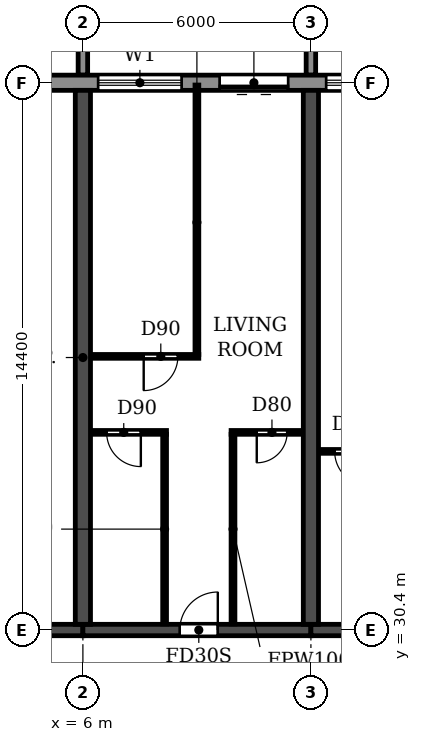
"""IFC4 building model, lengths in metres.
Left out: names, types, materials, properties, quantities, classifications, styles, units other than length and angle.
Written with IfcOpenShell. Run it as: python <this file> out.ifc"""

import sys

from ifc_helpers import new_model, si_unit, direction, frame, frame_2d, origin, place, context, subcontext, project, spatial, polyline, rectangle, outline, extrude, source, transform, mapped, element, fill, save


model = new_model("IFC4")
c1 = context("Model", 3, precision=1e-05, world=origin(), true_north=direction((0.0, 1.0)))
c2 = subcontext(c1, "Body", "Model", "MODEL_VIEW")
j1 = project(units=[si_unit("LENGTHUNIT", "METRE"), si_unit("PLANEANGLEUNIT", "RADIAN")], contexts=[c1])
p1 = place(None, origin())
s1 = spatial("IfcSite", under=j1, at=p1, CompositionType="ELEMENT")
p2 = place(p1, origin())
s2 = spatial("IfcBuilding", under=s1, at=p2, CompositionType="ELEMENT")
p3 = place(p2, frame((0.0, 0.0, 33.3)))
s3 = spatial("IfcBuildingStorey", under=s2, at=p3, CompositionType="ELEMENT", Elevation=33.3)
for number, where, z_axis, x_axis in (
    (1, (6.0, 30.55, 0.0), (0.0, 0.0, 1.0), (0.0, 1.0, 0.0)),
    (2, (12.0, 30.55, 0.0), (0.0, 0.0, 1.0), (0.0, 1.0, 0.0)),
):
    element("IfcWall", number, at=place(p3, frame(where, z_axis=z_axis, x_axis=x_axis)), inside=s3, PredefinedType="SHEAR", context=c2, shape_type="SweptSolid", body=[
        extrude(rectangle(XDim=14.05, YDim=0.4, at=frame_2d((7.025, 0.0))), origin(), (0.0, 0.0, 1.0), 3.05),
    ])
p4 = place(p3, frame((0.2, 30.4, 0.0), z_axis=(0.0, 0.0, 1.0), x_axis=(1.0, 0.0, 0.0)))
e3 = element("IfcWall", 3, at=p4, inside=s3, PredefinedType="SHEAR", context=c2, shape_type="SweptSolid", body=[
    extrude(rectangle(XDim=5.8, YDim=0.3, at=frame_2d((2.9, 0.0))), origin(), (0.0, 0.0, 1.0), 2.45),
])
p5 = place(p4, frame((2.3, 0.0, 0.0)))
e4 = element("IfcOpeningElement", 4, at=p5, cuts=e3, PredefinedType="OPENING", context=c2, shape_type="SweptSolid", body=[
    extrude(rectangle(XDim=1.0, YDim=2.1, at=frame_2d((0.5, 1.05))), frame((0.0, 0.16, 0.0), z_axis=(0.0, -1.0, 0.0), x_axis=(1.0, 0.0, 0.0)), (0.0, 0.0, 1.0), 0.32),
])
p6 = place(p3, frame((6.0, 30.4, 0.0), z_axis=(0.0, 0.0, 1.0), x_axis=(1.0, 0.0, 0.0)))
e5 = element("IfcWall", 5, at=p6, inside=s3, PredefinedType="SHEAR", context=c2, shape_type="SweptSolid", body=[
    extrude(rectangle(XDim=6.0, YDim=0.3, at=frame_2d((3.0, 0.0))), origin(), (0.0, 0.0, 1.0), 2.45),
])
p7 = place(p6, frame((2.55, 0.0, 0.0)))
e6 = element("IfcOpeningElement", 6, at=p7, cuts=e5, PredefinedType="OPENING", context=c2, shape_type="SweptSolid", body=[
    extrude(rectangle(XDim=1.0, YDim=2.1, at=frame_2d((0.5, 1.05))), frame((0.0, 0.16, 0.0), z_axis=(0.0, -1.0, 0.0), x_axis=(1.0, 0.0, 0.0)), (0.0, 0.0, 1.0), 0.32),
])
p8 = place(p3, frame((12.0, 30.4, 0.0), z_axis=(0.0, 0.0, 1.0), x_axis=(1.0, 0.0, 0.0)))
e7 = element("IfcWall", 7, at=p8, inside=s3, PredefinedType="SHEAR", context=c2, shape_type="SweptSolid", body=[
    extrude(rectangle(XDim=6.0, YDim=0.3, at=frame_2d((3.0, 0.0))), origin(), (0.0, 0.0, 1.0), 2.45),
])
p9 = place(p8, frame((2.55, 0.0, 0.0)))
e8 = element("IfcOpeningElement", 8, at=p9, cuts=e7, PredefinedType="OPENING", context=c2, shape_type="SweptSolid", body=[
    extrude(rectangle(XDim=1.0, YDim=2.1, at=frame_2d((0.5, 1.05))), frame((0.0, 0.16, 0.0), z_axis=(0.0, -1.0, 0.0), x_axis=(1.0, 0.0, 0.0)), (0.0, 0.0, 1.0), 0.32),
])
p10 = place(p3, frame((97.317, 44.8, 0.0), z_axis=(0.0, 0.0, 1.0), x_axis=(-1.0, 0.0, 0.0)))
e9 = element("IfcWall", 9, at=p10, inside=s3, PredefinedType="STANDARD", context=c2, shape_type="SweptSolid", body=[
    extrude(rectangle(XDim=92.634, YDim=0.4, at=frame_2d((46.317, 0.0))), origin(), (0.0, 0.0, 1.0), 3.05),
])
p11 = place(p10, frame((88.717, 0.0, 0.9)))
e10 = element("IfcOpeningElement", 10, at=p11, cuts=e9, PredefinedType="OPENING", context=c2, shape_type="SweptSolid", body=[
    extrude(rectangle(XDim=2.2, YDim=1.5, at=frame_2d((1.1, 0.75))), frame((0.0, 0.21, 0.0), z_axis=(0.0, -1.0, 0.0), x_axis=(1.0, 0.0, 0.0)), (0.0, 0.0, 1.0), 0.42),
])
p12 = place(p10, frame((85.917, 0.0, 0.0)))
e11 = element("IfcOpeningElement", 11, at=p12, cuts=e9, PredefinedType="OPENING", context=c2, shape_type="SweptSolid", body=[
    extrude(rectangle(XDim=1.8, YDim=2.4, at=frame_2d((0.9, 1.2))), frame((0.0, 0.21, 0.0), z_axis=(0.0, -1.0, 0.0), x_axis=(1.0, 0.0, 0.0)), (0.0, 0.0, 1.0), 0.42),
])
p13 = place(p10, frame((82.717, 0.0, 0.9)))
e12 = element("IfcOpeningElement", 12, at=p13, cuts=e9, PredefinedType="OPENING", context=c2, shape_type="SweptSolid", body=[
    extrude(rectangle(XDim=2.2, YDim=1.5, at=frame_2d((1.1, 0.75))), frame((0.0, 0.21, 0.0), z_axis=(0.0, -1.0, 0.0), x_axis=(1.0, 0.0, 0.0)), (0.0, 0.0, 1.0), 0.42),
])
p14 = place(p10, frame((79.917, 0.0, 0.0)))
e13 = element("IfcOpeningElement", 13, at=p14, cuts=e9, PredefinedType="OPENING", context=c2, shape_type="SweptSolid", body=[
    extrude(rectangle(XDim=1.8, YDim=2.4, at=frame_2d((0.9, 1.2))), frame((0.0, 0.21, 0.0), z_axis=(0.0, -1.0, 0.0), x_axis=(1.0, 0.0, 0.0)), (0.0, 0.0, 1.0), 0.42),
])
p15 = place(p10, frame((76.717, 0.0, 0.9)))
e14 = element("IfcOpeningElement", 14, at=p15, cuts=e9, PredefinedType="OPENING", context=c2, shape_type="SweptSolid", body=[
    extrude(rectangle(XDim=2.2, YDim=1.5, at=frame_2d((1.1, 0.75))), frame((0.0, 0.21, 0.0), z_axis=(0.0, -1.0, 0.0), x_axis=(1.0, 0.0, 0.0)), (0.0, 0.0, 1.0), 0.42),
])
p16 = place(p10, frame((73.717, 0.0, 0.9)))
e15 = element("IfcOpeningElement", 15, at=p16, cuts=e9, PredefinedType="OPENING", context=c2, shape_type="SweptSolid", body=[
    extrude(rectangle(XDim=2.2, YDim=1.5, at=frame_2d((1.1, 0.75))), frame((0.0, 0.21, 0.0), z_axis=(0.0, -1.0, 0.0), x_axis=(1.0, 0.0, 0.0)), (0.0, 0.0, 1.0), 0.42),
])
p17 = place(p10, frame((70.717, 0.0, 0.9)))
e16 = element("IfcOpeningElement", 16, at=p17, cuts=e9, PredefinedType="OPENING", context=c2, shape_type="SweptSolid", body=[
    extrude(rectangle(XDim=2.2, YDim=1.5, at=frame_2d((1.1, 0.75))), frame((0.0, 0.21, 0.0), z_axis=(0.0, -1.0, 0.0), x_axis=(1.0, 0.0, 0.0)), (0.0, 0.0, 1.0), 0.42),
])
p18 = place(p10, frame((67.917, 0.0, 0.0)))
e17 = element("IfcOpeningElement", 17, at=p18, cuts=e9, PredefinedType="OPENING", context=c2, shape_type="SweptSolid", body=[
    extrude(rectangle(XDim=1.8, YDim=2.4, at=frame_2d((0.9, 1.2))), frame((0.0, 0.21, 0.0), z_axis=(0.0, -1.0, 0.0), x_axis=(1.0, 0.0, 0.0)), (0.0, 0.0, 1.0), 0.42),
])
p19 = place(p10, frame((64.717, 0.0, 0.9)))
e18 = element("IfcOpeningElement", 18, at=p19, cuts=e9, PredefinedType="OPENING", context=c2, shape_type="SweptSolid", body=[
    extrude(rectangle(XDim=2.2, YDim=1.5, at=frame_2d((1.1, 0.75))), frame((0.0, 0.21, 0.0), z_axis=(0.0, -1.0, 0.0), x_axis=(1.0, 0.0, 0.0)), (0.0, 0.0, 1.0), 0.42),
])
p20 = place(p10, frame((61.717, 0.0, 0.9)))
e19 = element("IfcOpeningElement", 19, at=p20, cuts=e9, PredefinedType="OPENING", context=c2, shape_type="SweptSolid", body=[
    extrude(rectangle(XDim=2.2, YDim=1.5, at=frame_2d((1.1, 0.75))), frame((0.0, 0.21, 0.0), z_axis=(0.0, -1.0, 0.0), x_axis=(1.0, 0.0, 0.0)), (0.0, 0.0, 1.0), 0.42),
])
p21 = place(p10, frame((58.717, 0.0, 0.9)))
e20 = element("IfcOpeningElement", 20, at=p21, cuts=e9, PredefinedType="OPENING", context=c2, shape_type="SweptSolid", body=[
    extrude(rectangle(XDim=2.2, YDim=1.5, at=frame_2d((1.1, 0.75))), frame((0.0, 0.21, 0.0), z_axis=(0.0, -1.0, 0.0), x_axis=(1.0, 0.0, 0.0)), (0.0, 0.0, 1.0), 0.42),
])
p22 = place(p10, frame((55.917, 0.0, 0.0)))
e21 = element("IfcOpeningElement", 21, at=p22, cuts=e9, PredefinedType="OPENING", context=c2, shape_type="SweptSolid", body=[
    extrude(rectangle(XDim=1.8, YDim=2.4, at=frame_2d((0.9, 1.2))), frame((0.0, 0.21, 0.0), z_axis=(0.0, -1.0, 0.0), x_axis=(1.0, 0.0, 0.0)), (0.0, 0.0, 1.0), 0.42),
])
p23 = place(p10, frame((52.717, 0.0, 0.9)))
e22 = element("IfcOpeningElement", 22, at=p23, cuts=e9, PredefinedType="OPENING", context=c2, shape_type="SweptSolid", body=[
    extrude(rectangle(XDim=2.2, YDim=1.5, at=frame_2d((1.1, 0.75))), frame((0.0, 0.21, 0.0), z_axis=(0.0, -1.0, 0.0), x_axis=(1.0, 0.0, 0.0)), (0.0, 0.0, 1.0), 0.42),
])
p24 = place(p10, frame((49.717, 0.0, 0.9)))
e23 = element("IfcOpeningElement", 23, at=p24, cuts=e9, PredefinedType="OPENING", context=c2, shape_type="SweptSolid", body=[
    extrude(rectangle(XDim=2.2, YDim=1.5, at=frame_2d((1.1, 0.75))), frame((0.0, 0.21, 0.0), z_axis=(0.0, -1.0, 0.0), x_axis=(1.0, 0.0, 0.0)), (0.0, 0.0, 1.0), 0.42),
])
p25 = place(p10, frame((46.717, 0.0, 0.9)))
e24 = element("IfcOpeningElement", 24, at=p25, cuts=e9, PredefinedType="OPENING", context=c2, shape_type="SweptSolid", body=[
    extrude(rectangle(XDim=2.2, YDim=1.5, at=frame_2d((1.1, 0.75))), frame((0.0, 0.21, 0.0), z_axis=(0.0, -1.0, 0.0), x_axis=(1.0, 0.0, 0.0)), (0.0, 0.0, 1.0), 0.42),
])
p26 = place(p10, frame((43.917, 0.0, 0.0)))
e25 = element("IfcOpeningElement", 25, at=p26, cuts=e9, PredefinedType="OPENING", context=c2, shape_type="SweptSolid", body=[
    extrude(rectangle(XDim=1.8, YDim=2.4, at=frame_2d((0.9, 1.2))), frame((0.0, 0.21, 0.0), z_axis=(0.0, -1.0, 0.0), x_axis=(1.0, 0.0, 0.0)), (0.0, 0.0, 1.0), 0.42),
])
p27 = place(p10, frame((40.717, 0.0, 0.9)))
e26 = element("IfcOpeningElement", 26, at=p27, cuts=e9, PredefinedType="OPENING", context=c2, shape_type="SweptSolid", body=[
    extrude(rectangle(XDim=2.2, YDim=1.5, at=frame_2d((1.1, 0.75))), frame((0.0, 0.21, 0.0), z_axis=(0.0, -1.0, 0.0), x_axis=(1.0, 0.0, 0.0)), (0.0, 0.0, 1.0), 0.42),
])
p28 = place(p10, frame((37.717, 0.0, 0.9)))
e27 = element("IfcOpeningElement", 27, at=p28, cuts=e9, PredefinedType="OPENING", context=c2, shape_type="SweptSolid", body=[
    extrude(rectangle(XDim=2.2, YDim=1.5, at=frame_2d((1.1, 0.75))), frame((0.0, 0.21, 0.0), z_axis=(0.0, -1.0, 0.0), x_axis=(1.0, 0.0, 0.0)), (0.0, 0.0, 1.0), 0.42),
])
p29 = place(p10, frame((34.717, 0.0, 0.9)))
e28 = element("IfcOpeningElement", 28, at=p29, cuts=e9, PredefinedType="OPENING", context=c2, shape_type="SweptSolid", body=[
    extrude(rectangle(XDim=2.2, YDim=1.5, at=frame_2d((1.1, 0.75))), frame((0.0, 0.21, 0.0), z_axis=(0.0, -1.0, 0.0), x_axis=(1.0, 0.0, 0.0)), (0.0, 0.0, 1.0), 0.42),
])
p30 = place(p10, frame((31.917, 0.0, 0.0)))
e29 = element("IfcOpeningElement", 29, at=p30, cuts=e9, PredefinedType="OPENING", context=c2, shape_type="SweptSolid", body=[
    extrude(rectangle(XDim=1.8, YDim=2.4, at=frame_2d((0.9, 1.2))), frame((0.0, 0.21, 0.0), z_axis=(0.0, -1.0, 0.0), x_axis=(1.0, 0.0, 0.0)), (0.0, 0.0, 1.0), 0.42),
])
p31 = place(p10, frame((28.717, 0.0, 0.9)))
e30 = element("IfcOpeningElement", 30, at=p31, cuts=e9, PredefinedType="OPENING", context=c2, shape_type="SweptSolid", body=[
    extrude(rectangle(XDim=2.2, YDim=1.5, at=frame_2d((1.1, 0.75))), frame((0.0, 0.21, 0.0), z_axis=(0.0, -1.0, 0.0), x_axis=(1.0, 0.0, 0.0)), (0.0, 0.0, 1.0), 0.42),
])
p32 = place(p10, frame((25.717, 0.0, 0.9)))
e31 = element("IfcOpeningElement", 31, at=p32, cuts=e9, PredefinedType="OPENING", context=c2, shape_type="SweptSolid", body=[
    extrude(rectangle(XDim=2.2, YDim=1.5, at=frame_2d((1.1, 0.75))), frame((0.0, 0.21, 0.0), z_axis=(0.0, -1.0, 0.0), x_axis=(1.0, 0.0, 0.0)), (0.0, 0.0, 1.0), 0.42),
])
p33 = place(p10, frame((22.917, 0.0, 0.0)))
e32 = element("IfcOpeningElement", 32, at=p33, cuts=e9, PredefinedType="OPENING", context=c2, shape_type="SweptSolid", body=[
    extrude(rectangle(XDim=1.8, YDim=2.4, at=frame_2d((0.9, 1.2))), frame((0.0, 0.21, 0.0), z_axis=(0.0, -1.0, 0.0), x_axis=(1.0, 0.0, 0.0)), (0.0, 0.0, 1.0), 0.42),
])
p34 = place(p10, frame((19.717, 0.0, 0.9)))
e33 = element("IfcOpeningElement", 33, at=p34, cuts=e9, PredefinedType="OPENING", context=c2, shape_type="SweptSolid", body=[
    extrude(rectangle(XDim=2.2, YDim=1.5, at=frame_2d((1.1, 0.75))), frame((0.0, 0.21, 0.0), z_axis=(0.0, -1.0, 0.0), x_axis=(1.0, 0.0, 0.0)), (0.0, 0.0, 1.0), 0.42),
])
p35 = place(p10, frame((16.717, 0.0, 0.9)))
e34 = element("IfcOpeningElement", 34, at=p35, cuts=e9, PredefinedType="OPENING", context=c2, shape_type="SweptSolid", body=[
    extrude(rectangle(XDim=2.2, YDim=1.5, at=frame_2d((1.1, 0.75))), frame((0.0, 0.21, 0.0), z_axis=(0.0, -1.0, 0.0), x_axis=(1.0, 0.0, 0.0)), (0.0, 0.0, 1.0), 0.42),
])
p36 = place(p10, frame((13.917, 0.0, 0.0)))
e35 = element("IfcOpeningElement", 35, at=p36, cuts=e9, PredefinedType="OPENING", context=c2, shape_type="SweptSolid", body=[
    extrude(rectangle(XDim=1.8, YDim=2.4, at=frame_2d((0.9, 1.2))), frame((0.0, 0.21, 0.0), z_axis=(0.0, -1.0, 0.0), x_axis=(1.0, 0.0, 0.0)), (0.0, 0.0, 1.0), 0.42),
])
p37 = place(p10, frame((10.717, 0.0, 0.9)))
e36 = element("IfcOpeningElement", 36, at=p37, cuts=e9, PredefinedType="OPENING", context=c2, shape_type="SweptSolid", body=[
    extrude(rectangle(XDim=2.2, YDim=1.5, at=frame_2d((1.1, 0.75))), frame((0.0, 0.21, 0.0), z_axis=(0.0, -1.0, 0.0), x_axis=(1.0, 0.0, 0.0)), (0.0, 0.0, 1.0), 0.42),
])
p38 = place(p10, frame((7.917, 0.0, 0.0)))
e37 = element("IfcOpeningElement", 37, at=p38, cuts=e9, PredefinedType="OPENING", context=c2, shape_type="SweptSolid", body=[
    extrude(rectangle(XDim=1.8, YDim=2.4, at=frame_2d((0.9, 1.2))), frame((0.0, 0.21, 0.0), z_axis=(0.0, -1.0, 0.0), x_axis=(1.0, 0.0, 0.0)), (0.0, 0.0, 1.0), 0.42),
])
p39 = place(p10, frame((4.717, 0.0, 0.9)))
e38 = element("IfcOpeningElement", 38, at=p39, cuts=e9, PredefinedType="OPENING", context=c2, shape_type="SweptSolid", body=[
    extrude(rectangle(XDim=2.2, YDim=1.5, at=frame_2d((1.1, 0.75))), frame((0.0, 0.21, 0.0), z_axis=(0.0, -1.0, 0.0), x_axis=(1.0, 0.0, 0.0)), (0.0, 0.0, 1.0), 0.42),
])
p40 = place(p10, frame((1.917, 0.0, 0.0)))
e39 = element("IfcOpeningElement", 39, at=p40, cuts=e9, PredefinedType="OPENING", context=c2, shape_type="SweptSolid", body=[
    extrude(rectangle(XDim=1.8, YDim=2.4, at=frame_2d((0.9, 1.2))), frame((0.0, 0.21, 0.0), z_axis=(0.0, -1.0, 0.0), x_axis=(1.0, 0.0, 0.0)), (0.0, 0.0, 1.0), 0.42),
])
m1 = source(origin(), c2, "Body", "SweptSolid", [
    extrude(outline(polyline([(0.0, 0.0), (0.25, 0.0), (0.25, 3.1), (0.0, 3.1), (0.0, 0.0)])), origin(), (0.0, 0.0, 1.0), 3.1),
])
for number, where in (
    (40, (5.875, 45.0, 0.0)),
    (41, (11.875, 45.0, 0.0)),
):
    element("IfcWall", number, at=place(p3, frame(where)), inside=s3, PredefinedType="STANDARD", context=c2, shape_type="MappedRepresentation", body=[
        mapped(m1, transform((0.0, 0.0, 0.0))),
    ])
p41 = place(p3, frame((12.21, 35.1, 0.0), z_axis=(0.0, 0.0, 1.0), x_axis=(1.0, 0.0, 0.0)))
e42 = element("IfcWall", 42, at=p41, inside=s3, PredefinedType="PARTITIONING", context=c2, shape_type="SweptSolid", body=[
    extrude(rectangle(XDim=1.99, YDim=0.1, at=frame_2d((0.995, 0.0))), origin(), (0.0, 0.0, 1.0), 3.05),
])
p42 = place(p41, frame((0.415, 0.0, 0.0)))
e43 = element("IfcOpeningElement", 43, at=p42, cuts=e42, PredefinedType="OPENING", context=c2, shape_type="SweptSolid", body=[
    extrude(rectangle(XDim=0.9, YDim=2.1, at=frame_2d((0.45, 1.05))), frame((0.0, 0.06, 0.0), z_axis=(0.0, -1.0, 0.0), x_axis=(1.0, 0.0, 0.0)), (0.0, 0.0, 1.0), 0.12),
])
p43 = place(p3, frame((6.21, 35.6, 0.0), z_axis=(0.0, 0.0, 1.0), x_axis=(1.0, 0.0, 0.0)))
e44 = element("IfcWall", 44, at=p43, inside=s3, PredefinedType="PARTITIONING", context=c2, shape_type="SweptSolid", body=[
    extrude(rectangle(XDim=1.99, YDim=0.1, at=frame_2d((0.995, 0.0))), origin(), (0.0, 0.0, 1.0), 3.05),
])
p44 = place(p43, frame((0.415, 0.0, 0.0)))
e45 = element("IfcOpeningElement", 45, at=p44, cuts=e44, PredefinedType="OPENING", context=c2, shape_type="SweptSolid", body=[
    extrude(rectangle(XDim=0.9, YDim=2.1, at=frame_2d((0.45, 1.05))), frame((0.0, 0.06, 0.0), z_axis=(0.0, -1.0, 0.0), x_axis=(1.0, 0.0, 0.0)), (0.0, 0.0, 1.0), 0.12),
])
p45 = place(p3, frame((9.9, 35.6, 0.0), z_axis=(0.0, 0.0, 1.0), x_axis=(1.0, 0.0, 0.0)))
e46 = element("IfcWall", 46, at=p45, inside=s3, PredefinedType="PARTITIONING", context=c2, shape_type="SweptSolid", body=[
    extrude(rectangle(XDim=1.89, YDim=0.1, at=frame_2d((0.945, 0.0))), origin(), (0.0, 0.0, 1.0), 3.05),
])
p46 = place(p45, frame((0.675, 0.0, 0.0)))
e47 = element("IfcOpeningElement", 47, at=p46, cuts=e46, PredefinedType="OPENING", context=c2, shape_type="SweptSolid", body=[
    extrude(rectangle(XDim=0.8, YDim=2.1, at=frame_2d((0.4, 1.05))), frame((0.0, 0.06, 0.0), z_axis=(0.0, -1.0, 0.0), x_axis=(1.0, 0.0, 0.0)), (0.0, 0.0, 1.0), 0.12),
])
p47 = place(p3, frame((6.21, 37.6, 0.0), z_axis=(0.0, 0.0, 1.0), x_axis=(1.0, 0.0, 0.0)))
e48 = element("IfcWall", 48, at=p47, inside=s3, PredefinedType="PARTITIONING", context=c2, shape_type="SweptSolid", body=[
    extrude(rectangle(XDim=2.84, YDim=0.1, at=frame_2d((1.42, 0.0))), origin(), (0.0, 0.0, 1.0), 3.05),
])
p48 = place(p47, frame((1.39, 0.0, 0.0)))
e49 = element("IfcOpeningElement", 49, at=p48, cuts=e48, PredefinedType="OPENING", context=c2, shape_type="SweptSolid", body=[
    extrude(rectangle(XDim=0.9, YDim=2.1, at=frame_2d((0.45, 1.05))), frame((0.0, 0.06, 0.0), z_axis=(0.0, -1.0, 0.0), x_axis=(1.0, 0.0, 0.0)), (0.0, 0.0, 1.0), 0.12),
])
p49 = place(p3, frame((8.15, 30.56, 0.0), z_axis=(0.0, 0.0, 1.0), x_axis=(0.0, 1.0, 0.0)))
e50 = element("IfcWall", 50, at=p49, inside=s3, PredefinedType="PARTITIONING", context=c2, shape_type="SweptSolid", body=[
    extrude(rectangle(XDim=4.99, YDim=0.1, at=frame_2d((2.495, 0.0))), origin(), (0.0, 0.0, 1.0), 3.05),
])
p50 = place(p3, frame((9.0, 37.65, 0.0), z_axis=(0.0, 0.0, 1.0), x_axis=(0.0, 1.0, 0.0)))
e51 = element("IfcWall", 51, at=p50, inside=s3, PredefinedType="PARTITIONING", context=c2, shape_type="SweptSolid", body=[
    extrude(rectangle(XDim=7.09, YDim=0.1, at=frame_2d((3.545, 0.0))), origin(), (0.0, 0.0, 1.0), 3.05),
])
p51 = place(p3, frame((9.95, 30.56, 0.0), z_axis=(0.0, 0.0, 1.0), x_axis=(0.0, 1.0, 0.0)))
e52 = element("IfcWall", 52, at=p51, inside=s3, PredefinedType="PARTITIONING", context=c2, shape_type="SweptSolid", body=[
    extrude(rectangle(XDim=4.99, YDim=0.1, at=frame_2d((2.495, 0.0))), origin(), (0.0, 0.0, 1.0), 3.05),
])
p52 = place(p11, origin())
e53 = element("IfcWindow", 53, at=p52, inside=s3, PartitioningType="DOUBLE_PANEL_HORIZONTAL", PredefinedType="WINDOW", context=c2, shape_type="SweptSolid", body=[
    extrude(rectangle(XDim=2.2, YDim=1.5, at=frame_2d((1.1, 0.75))), frame((0.0, 0.03, 0.0), z_axis=(0.0, -1.0, 0.0), x_axis=(1.0, 0.0, 0.0)), (0.0, 0.0, 1.0), 0.06),
])
fill(e10, e53)
p53 = place(p12, origin())
e54 = element("IfcDoor", 54, at=p53, inside=s3, OperationType="DOUBLE_DOOR_SLIDING", PredefinedType="DOOR", context=c2, shape_type="SweptSolid", body=[
    extrude(rectangle(XDim=1.8, YDim=2.4, at=frame_2d((0.9, 1.2))), frame((0.0, 0.025, 0.0), z_axis=(0.0, -1.0, 0.0), x_axis=(1.0, 0.0, 0.0)), (0.0, 0.0, 1.0), 0.05),
])
fill(e11, e54)
p54 = place(p13, origin())
e55 = element("IfcWindow", 55, at=p54, inside=s3, PartitioningType="DOUBLE_PANEL_HORIZONTAL", PredefinedType="WINDOW", context=c2, shape_type="SweptSolid", body=[
    extrude(rectangle(XDim=2.2, YDim=1.5, at=frame_2d((1.1, 0.75))), frame((0.0, 0.03, 0.0), z_axis=(0.0, -1.0, 0.0), x_axis=(1.0, 0.0, 0.0)), (0.0, 0.0, 1.0), 0.06),
])
fill(e12, e55)
p55 = place(p44, frame((0.9, 0.0, 0.0), z_axis=(0.0, 0.0, 1.0), x_axis=(-1.0, 0.0, 0.0)))
e56 = element("IfcDoor", 56, at=p55, inside=s3, OperationType="SINGLE_SWING_LEFT", PredefinedType="DOOR", context=c2, shape_type="SweptSolid", body=[
    extrude(rectangle(XDim=0.9, YDim=2.1, at=frame_2d((0.45, 1.05))), frame((0.0, 0.025, 0.0), z_axis=(0.0, -1.0, 0.0), x_axis=(1.0, 0.0, 0.0)), (0.0, 0.0, 1.0), 0.05),
])
fill(e45, e56)
p56 = place(p48, frame((0.9, 0.0, 0.0), z_axis=(0.0, 0.0, 1.0), x_axis=(-1.0, 0.0, 0.0)))
e57 = element("IfcDoor", 57, at=p56, inside=s3, OperationType="SINGLE_SWING_RIGHT", PredefinedType="DOOR", context=c2, shape_type="SweptSolid", body=[
    extrude(rectangle(XDim=0.9, YDim=2.1, at=frame_2d((0.45, 1.05))), frame((0.0, 0.025, 0.0), z_axis=(0.0, -1.0, 0.0), x_axis=(1.0, 0.0, 0.0)), (0.0, 0.0, 1.0), 0.05),
])
fill(e49, e57)
p57 = place(p7, origin())
e58 = element("IfcDoor", 58, at=p57, inside=s3, OperationType="SINGLE_SWING_RIGHT", PredefinedType="DOOR", context=c2, shape_type="SweptSolid", body=[
    extrude(rectangle(XDim=1.0, YDim=2.1, at=frame_2d((0.5, 1.05))), frame((0.0, 0.025, 0.0), z_axis=(0.0, -1.0, 0.0), x_axis=(1.0, 0.0, 0.0)), (0.0, 0.0, 1.0), 0.05),
])
fill(e6, e58)
p58 = place(p46, frame((0.8, 0.0, 0.0), z_axis=(0.0, 0.0, 1.0), x_axis=(-1.0, 0.0, 0.0)))
e59 = element("IfcDoor", 59, at=p58, inside=s3, OperationType="SINGLE_SWING_RIGHT", PredefinedType="DOOR", context=c2, shape_type="SweptSolid", body=[
    extrude(rectangle(XDim=0.8, YDim=2.1, at=frame_2d((0.4, 1.05))), frame((0.0, 0.025, 0.0), z_axis=(0.0, -1.0, 0.0), x_axis=(1.0, 0.0, 0.0)), (0.0, 0.0, 1.0), 0.05),
])
fill(e47, e59)
p59 = place(p42, frame((0.9, 0.0, 0.0), z_axis=(0.0, 0.0, 1.0), x_axis=(-1.0, 0.0, 0.0)))
e60 = element("IfcDoor", 60, at=p59, inside=s3, OperationType="SINGLE_SWING_LEFT", PredefinedType="DOOR", context=c2, shape_type="SweptSolid", body=[
    extrude(rectangle(XDim=0.9, YDim=2.1, at=frame_2d((0.45, 1.05))), frame((0.0, 0.025, 0.0), z_axis=(0.0, -1.0, 0.0), x_axis=(1.0, 0.0, 0.0)), (0.0, 0.0, 1.0), 0.05),
])
fill(e43, e60)
save(model, sys.argv[1])
